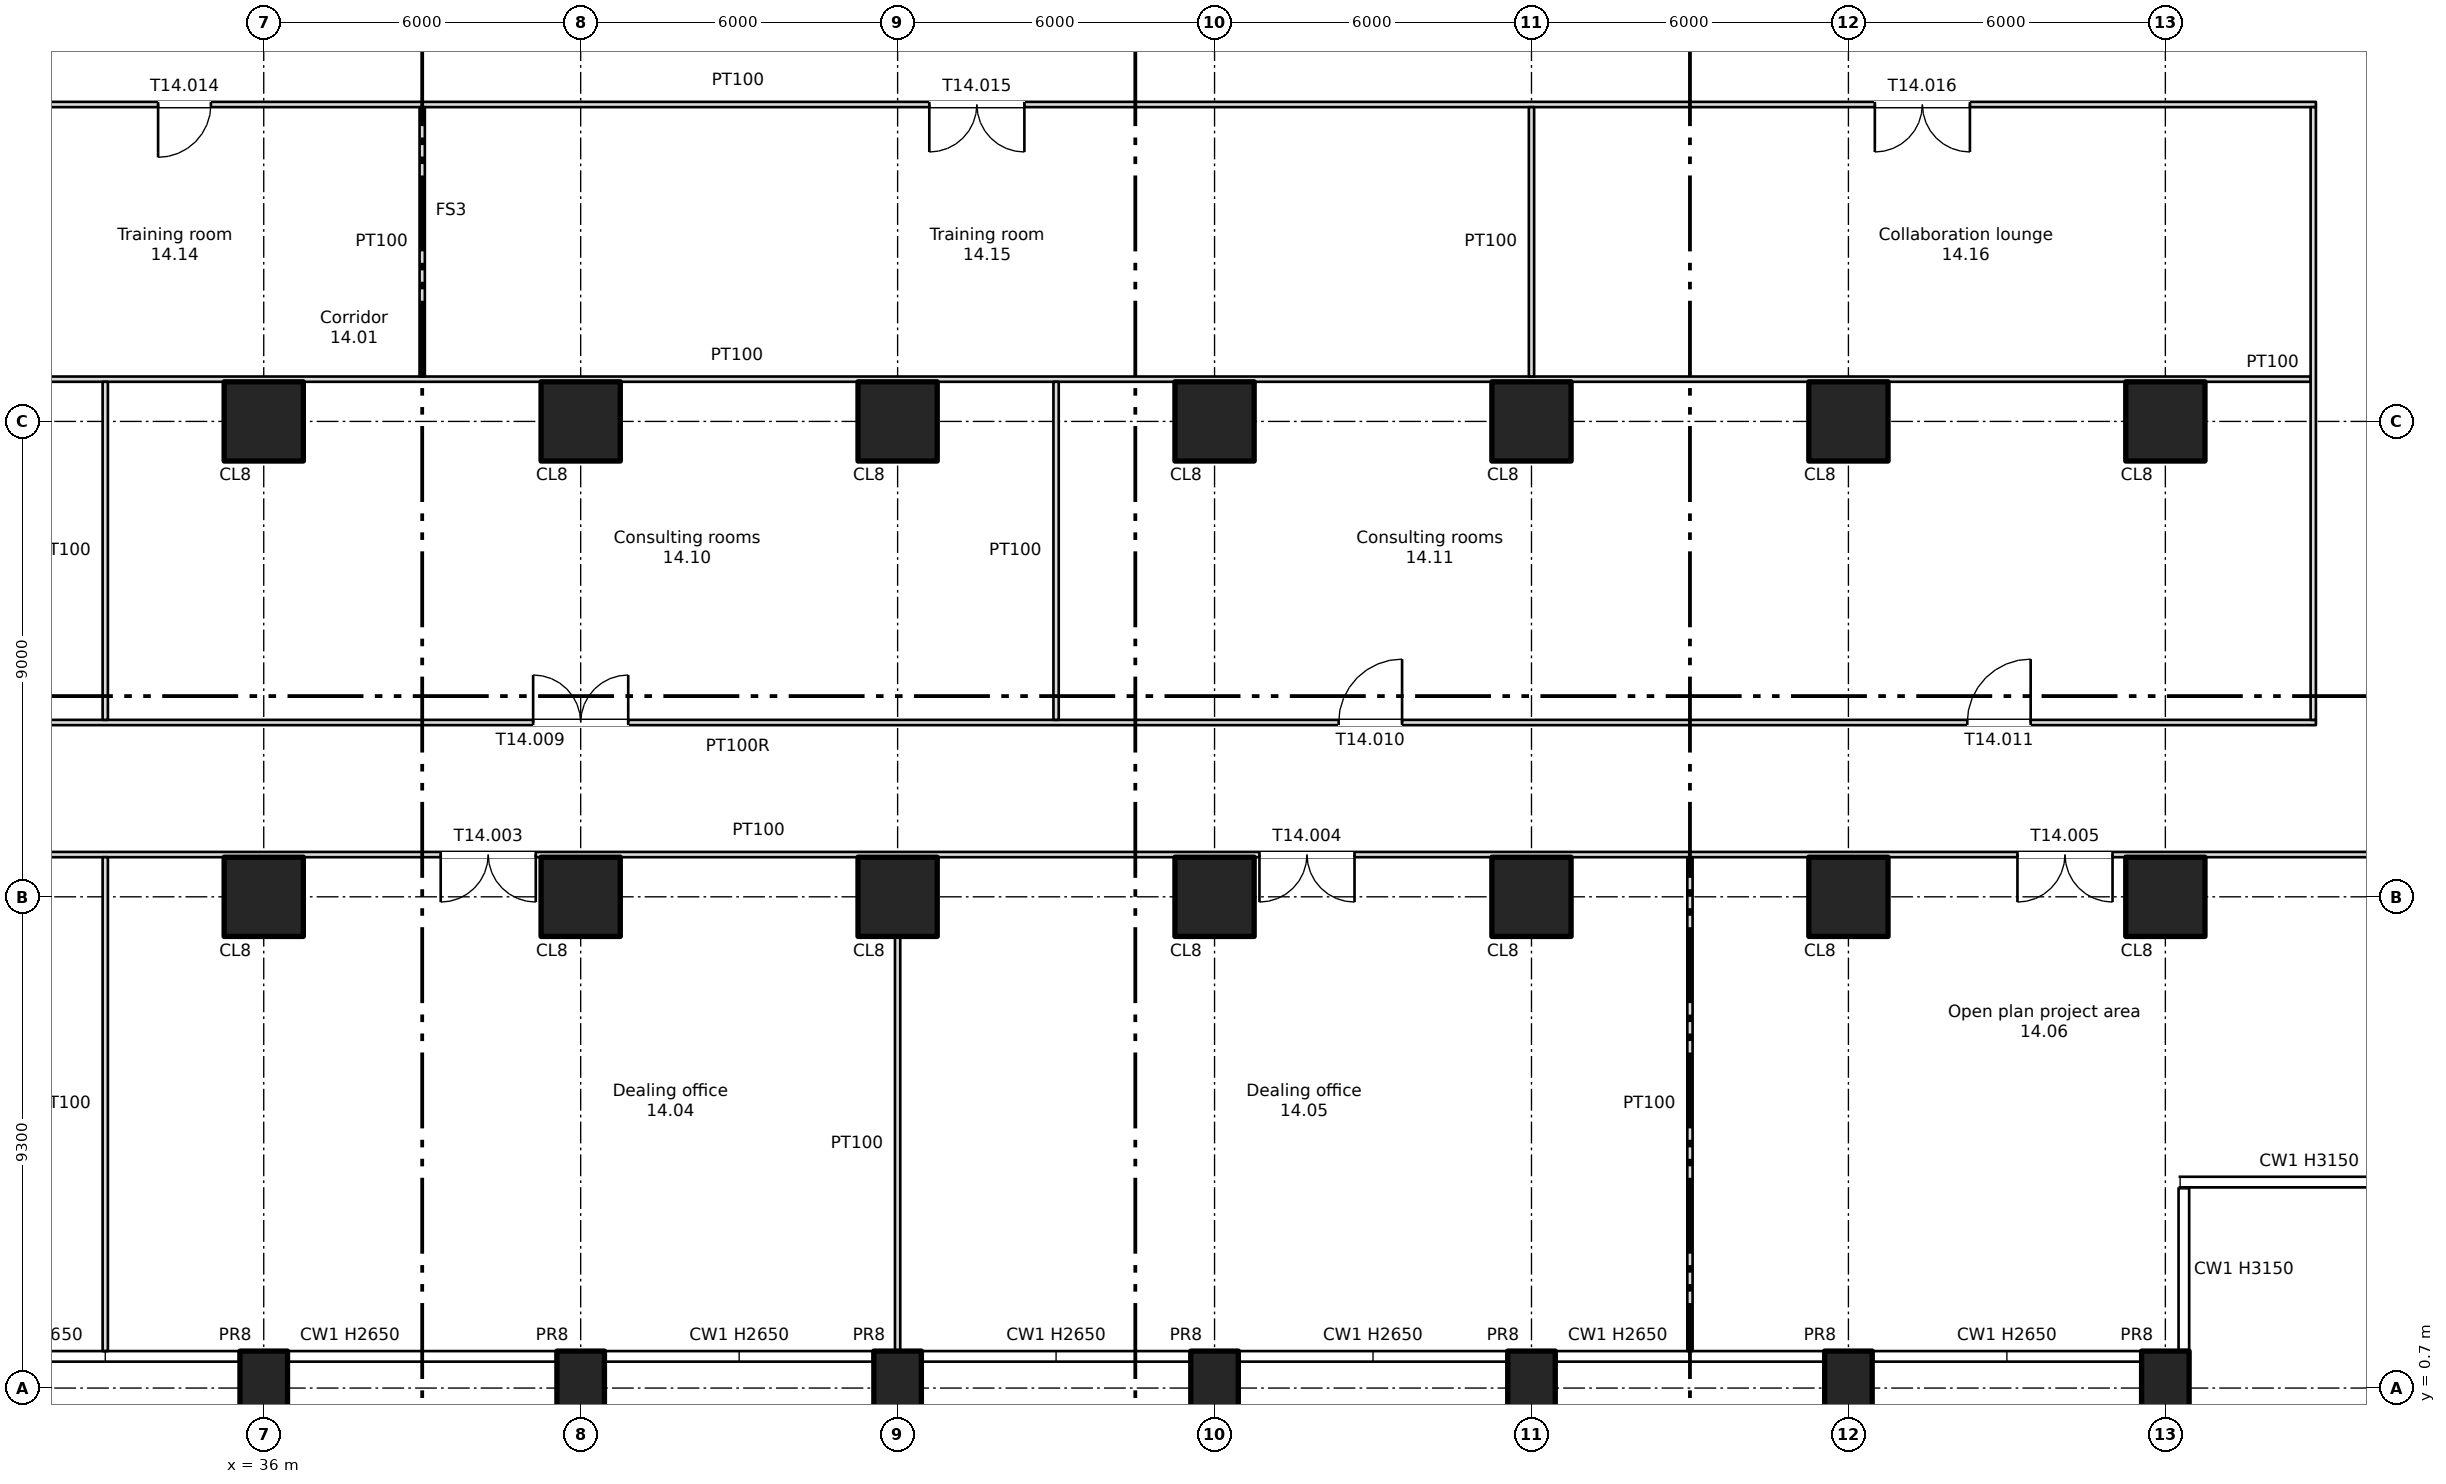
"""IFC4 building model, lengths in metres.
Left out: names, types, materials, properties, quantities, classifications, styles, units other than length and angle.
Written with IfcOpenShell. Run it as: python <this file> out.ifc"""

import sys

from ifc_helpers import new_model, si_unit, direction, frame, frame_2d, origin, origin_2d, place, context, subcontext, project, spatial, rectangle, extrude, element, fill, save


model = new_model("IFC4")
c1 = context("Model", 3, precision=1e-05, world=origin(), true_north=direction((0.0, 1.0)))
c2 = subcontext(c1, "Body", "Model", "MODEL_VIEW")
j1 = project(units=[si_unit("LENGTHUNIT", "METRE"), si_unit("PLANEANGLEUNIT", "RADIAN")], contexts=[c1])
p1 = place(None, origin())
s1 = spatial("IfcSite", under=j1, at=p1, CompositionType="ELEMENT")
p2 = place(p1, origin())
s2 = spatial("IfcBuilding", under=s1, at=p2, CompositionType="ELEMENT")
p3 = place(p2, frame((0.0, 0.0, 86.25)))
s3 = spatial("IfcBuildingStorey", under=s2, at=p3, CompositionType="ELEMENT", Elevation=86.25)
for number, where, z_axis, x_axis in (
    (1, (36.0, 0.7, -0.4), (0.0, 0.0, 1.0), (1.0, 0.0, 0.0)),
    (2, (42.0, 0.7, -0.4), (0.0, 0.0, 1.0), (1.0, 0.0, 0.0)),
    (3, (48.0, 0.7, -0.4), (0.0, 0.0, 1.0), (1.0, 0.0, 0.0)),
    (4, (54.0, 0.7, -0.4), (0.0, 0.0, 1.0), (1.0, 0.0, 0.0)),
    (5, (60.0, 0.7, -0.4), (0.0, 0.0, 1.0), (1.0, 0.0, 0.0)),
    (6, (66.0, 0.7, -0.4), (0.0, 0.0, 1.0), (1.0, 0.0, 0.0)),
    (7, (72.0, 0.7, -0.4), (0.0, 0.0, 1.0), (1.0, 0.0, 0.0)),
):
    element("IfcColumn", number, at=place(p3, frame(where, z_axis=z_axis, x_axis=x_axis)), inside=s3, PredefinedType="COLUMN", context=c2, shape_type="SweptSolid", body=[
        extrude(rectangle(XDim=0.9, YDim=1.4, at=origin_2d()), origin(), (0.0, 0.0, 1.0), 3.55),
    ])
for number, where, z_axis, x_axis in (
    (8, (36.0, 10.0, 0.0), (0.0, 0.0, 1.0), (1.0, 0.0, 0.0)),
    (9, (36.0, 19.0, 0.0), (0.0, 0.0, 1.0), (1.0, 0.0, 0.0)),
    (10, (42.0, 10.0, 0.0), (0.0, 0.0, 1.0), (1.0, 0.0, 0.0)),
    (11, (42.0, 19.0, 0.0), (0.0, 0.0, 1.0), (1.0, 0.0, 0.0)),
    (12, (48.0, 10.0, 0.0), (0.0, 0.0, 1.0), (1.0, 0.0, 0.0)),
    (13, (48.0, 19.0, 0.0), (0.0, 0.0, 1.0), (1.0, 0.0, 0.0)),
    (14, (54.0, 10.0, 0.0), (0.0, 0.0, 1.0), (1.0, 0.0, 0.0)),
    (15, (54.0, 19.0, 0.0), (0.0, 0.0, 1.0), (1.0, 0.0, 0.0)),
    (16, (60.0, 10.0, 0.0), (0.0, 0.0, 1.0), (1.0, 0.0, 0.0)),
    (17, (60.0, 19.0, 0.0), (0.0, 0.0, 1.0), (1.0, 0.0, 0.0)),
    (18, (66.0, 10.0, 0.0), (0.0, 0.0, 1.0), (1.0, 0.0, 0.0)),
    (19, (66.0, 19.0, 0.0), (0.0, 0.0, 1.0), (1.0, 0.0, 0.0)),
    (20, (72.0, 10.0, 0.0), (0.0, 0.0, 1.0), (1.0, 0.0, 0.0)),
    (21, (72.0, 19.0, 0.0), (0.0, 0.0, 1.0), (1.0, 0.0, 0.0)),
):
    element("IfcColumn", number, at=place(p3, frame(where, z_axis=z_axis, x_axis=x_axis)), inside=s3, PredefinedType="COLUMN", context=c2, shape_type="SweptSolid", body=[
        extrude(rectangle(XDim=1.5, YDim=1.5, at=origin_2d()), origin(), (0.0, 0.0, 1.0), 3.15),
    ])
p4 = place(p3, frame((0.8, 10.8, 0.0), z_axis=(0.0, 0.0, 1.0), x_axis=(1.0, 0.0, 0.0)))
e22 = element("IfcWall", 22, at=p4, inside=s3, PredefinedType="PARTITIONING", context=c2, shape_type="SweptSolid", body=[
    extrude(rectangle(XDim=76.4, YDim=0.1, at=frame_2d((38.2, 0.0))), origin(), (0.0, 0.0, 1.0), 3.15),
])
p5 = place(p4, frame((14.55, 0.0, 0.0)))
e23 = element("IfcOpeningElement", 23, at=p5, cuts=e22, PredefinedType="OPENING", context=c2, shape_type="SweptSolid", body=[
    extrude(rectangle(XDim=1.8, YDim=2.1, at=frame_2d((0.9, 1.05))), frame((0.0, 0.06, 0.0), z_axis=(0.0, -1.0, 0.0), x_axis=(1.0, 0.0, 0.0)), (0.0, 0.0, 1.0), 0.12),
])
p6 = place(p4, frame((26.55, 0.0, 0.0)))
e24 = element("IfcOpeningElement", 24, at=p6, cuts=e22, PredefinedType="OPENING", context=c2, shape_type="SweptSolid", body=[
    extrude(rectangle(XDim=1.8, YDim=2.1, at=frame_2d((0.9, 1.05))), frame((0.0, 0.06, 0.0), z_axis=(0.0, -1.0, 0.0), x_axis=(1.0, 0.0, 0.0)), (0.0, 0.0, 1.0), 0.12),
])
p7 = place(p4, frame((38.55, 0.0, 0.0)))
e25 = element("IfcOpeningElement", 25, at=p7, cuts=e22, PredefinedType="OPENING", context=c2, shape_type="SweptSolid", body=[
    extrude(rectangle(XDim=1.8, YDim=2.1, at=frame_2d((0.9, 1.05))), frame((0.0, 0.06, 0.0), z_axis=(0.0, -1.0, 0.0), x_axis=(1.0, 0.0, 0.0)), (0.0, 0.0, 1.0), 0.12),
])
p8 = place(p4, frame((54.05, 0.0, 0.0)))
e26 = element("IfcOpeningElement", 26, at=p8, cuts=e22, PredefinedType="OPENING", context=c2, shape_type="SweptSolid", body=[
    extrude(rectangle(XDim=1.8, YDim=2.1, at=frame_2d((0.9, 1.05))), frame((0.0, 0.06, 0.0), z_axis=(0.0, -1.0, 0.0), x_axis=(1.0, 0.0, 0.0)), (0.0, 0.0, 1.0), 0.12),
])
p9 = place(p4, frame((68.4, 0.0, 0.0)))
e27 = element("IfcOpeningElement", 27, at=p9, cuts=e22, PredefinedType="OPENING", context=c2, shape_type="SweptSolid", body=[
    extrude(rectangle(XDim=1.8, YDim=2.1, at=frame_2d((0.9, 1.05))), frame((0.0, 0.06, 0.0), z_axis=(0.0, -1.0, 0.0), x_axis=(1.0, 0.0, 0.0)), (0.0, 0.0, 1.0), 0.12),
])
p10 = place(p4, frame((2.45, 0.0, 0.0)))
e28 = element("IfcOpeningElement", 28, at=p10, cuts=e22, PredefinedType="OPENING", context=c2, shape_type="SweptSolid", body=[
    extrude(rectangle(XDim=1.8, YDim=2.1, at=frame_2d((0.9, 1.05))), frame((0.0, 0.06, 0.0), z_axis=(0.0, -1.0, 0.0), x_axis=(1.0, 0.0, 0.0)), (0.0, 0.0, 1.0), 0.12),
])
p11 = place(p3, frame((3.15, 13.3, 0.0), z_axis=(0.0, 0.0, 1.0), x_axis=(1.0, 0.0, 0.0)))
e29 = element("IfcWall", 29, at=p11, inside=s3, PredefinedType="PARTITIONING", context=c2, shape_type="SweptSolid", body=[
    extrude(rectangle(XDim=71.7, YDim=0.1, at=frame_2d((35.85, 0.0))), origin(), (0.0, 0.0, 1.0), 3.15),
])
p12 = place(p11, frame((5.45, 0.0, 0.0)))
e30 = element("IfcOpeningElement", 30, at=p12, cuts=e29, PredefinedType="OPENING", context=c2, shape_type="SweptSolid", body=[
    extrude(rectangle(XDim=1.0, YDim=2.1, at=frame_2d((0.5, 1.05))), frame((0.0, 0.06, 0.0), z_axis=(0.0, -1.0, 0.0), x_axis=(1.0, 0.0, 0.0)), (0.0, 0.0, 1.0), 0.12),
])
p13 = place(p11, frame((19.95, 0.0, 0.0)))
e31 = element("IfcOpeningElement", 31, at=p13, cuts=e29, PredefinedType="OPENING", context=c2, shape_type="SweptSolid", body=[
    extrude(rectangle(XDim=1.8, YDim=2.1, at=frame_2d((0.9, 1.05))), frame((0.0, 0.06, 0.0), z_axis=(0.0, -1.0, 0.0), x_axis=(1.0, 0.0, 0.0)), (0.0, 0.0, 1.0), 0.12),
])
p14 = place(p11, frame((37.95, 0.0, 0.0)))
e32 = element("IfcOpeningElement", 32, at=p14, cuts=e29, PredefinedType="OPENING", context=c2, shape_type="SweptSolid", body=[
    extrude(rectangle(XDim=1.8, YDim=2.1, at=frame_2d((0.9, 1.05))), frame((0.0, 0.06, 0.0), z_axis=(0.0, -1.0, 0.0), x_axis=(1.0, 0.0, 0.0)), (0.0, 0.0, 1.0), 0.12),
])
p15 = place(p11, frame((53.2, 0.0, 0.0)))
e33 = element("IfcOpeningElement", 33, at=p15, cuts=e29, PredefinedType="OPENING", context=c2, shape_type="SweptSolid", body=[
    extrude(rectangle(XDim=1.2, YDim=2.1, at=frame_2d((0.6, 1.05))), frame((0.0, 0.06, 0.0), z_axis=(0.0, -1.0, 0.0), x_axis=(1.0, 0.0, 0.0)), (0.0, 0.0, 1.0), 0.12),
])
p16 = place(p11, frame((65.1, 0.0, 0.0)))
e34 = element("IfcOpeningElement", 34, at=p16, cuts=e29, PredefinedType="OPENING", context=c2, shape_type="SweptSolid", body=[
    extrude(rectangle(XDim=1.2, YDim=2.1, at=frame_2d((0.6, 1.05))), frame((0.0, 0.06, 0.0), z_axis=(0.0, -1.0, 0.0), x_axis=(1.0, 0.0, 0.0)), (0.0, 0.0, 1.0), 0.12),
])
p17 = place(p3, frame((3.25, 19.8, 0.0), z_axis=(0.0, 0.0, 1.0), x_axis=(1.0, 0.0, 0.0)))
e35 = element("IfcWall", 35, at=p17, inside=s3, PredefinedType="PARTITIONING", context=c2, shape_type="SweptSolid", body=[
    extrude(rectangle(XDim=71.5, YDim=0.1, at=frame_2d((35.75, 0.0))), origin(), (0.0, 0.0, 1.0), 3.15),
])
p18 = place(p3, frame((3.15, 25.0, 0.0), z_axis=(0.0, 0.0, 1.0), x_axis=(1.0, 0.0, 0.0)))
e36 = element("IfcWall", 36, at=p18, inside=s3, PredefinedType="PARTITIONING", context=c2, shape_type="SweptSolid", body=[
    extrude(rectangle(XDim=71.7, YDim=0.1, at=frame_2d((35.85, 0.0))), origin(), (0.0, 0.0, 1.0), 3.15),
])
p19 = place(p18, frame((6.55, 0.0, 0.0)))
e37 = element("IfcOpeningElement", 37, at=p19, cuts=e36, PredefinedType="OPENING", context=c2, shape_type="SweptSolid", body=[
    extrude(rectangle(XDim=1.8, YDim=2.1, at=frame_2d((0.9, 1.05))), frame((0.0, 0.06, 0.0), z_axis=(0.0, -1.0, 0.0), x_axis=(1.0, 0.0, 0.0)), (0.0, 0.0, 1.0), 0.12),
])
p20 = place(p18, frame((19.95, 0.0, 0.0)))
e38 = element("IfcOpeningElement", 38, at=p20, cuts=e36, PredefinedType="OPENING", context=c2, shape_type="SweptSolid", body=[
    extrude(rectangle(XDim=1.8, YDim=2.1, at=frame_2d((0.9, 1.05))), frame((0.0, 0.06, 0.0), z_axis=(0.0, -1.0, 0.0), x_axis=(1.0, 0.0, 0.0)), (0.0, 0.0, 1.0), 0.12),
])
p21 = place(p18, frame((30.85, 0.0, 0.0)))
e39 = element("IfcOpeningElement", 39, at=p21, cuts=e36, PredefinedType="OPENING", context=c2, shape_type="SweptSolid", body=[
    extrude(rectangle(XDim=1.0, YDim=2.1, at=frame_2d((0.5, 1.05))), frame((0.0, 0.06, 0.0), z_axis=(0.0, -1.0, 0.0), x_axis=(1.0, 0.0, 0.0)), (0.0, 0.0, 1.0), 0.12),
])
p22 = place(p18, frame((45.45, 0.0, 0.0)))
e40 = element("IfcOpeningElement", 40, at=p22, cuts=e36, PredefinedType="OPENING", context=c2, shape_type="SweptSolid", body=[
    extrude(rectangle(XDim=1.8, YDim=2.1, at=frame_2d((0.9, 1.05))), frame((0.0, 0.06, 0.0), z_axis=(0.0, -1.0, 0.0), x_axis=(1.0, 0.0, 0.0)), (0.0, 0.0, 1.0), 0.12),
])
p23 = place(p18, frame((63.35, 0.0, 0.0)))
e41 = element("IfcOpeningElement", 41, at=p23, cuts=e36, PredefinedType="OPENING", context=c2, shape_type="SweptSolid", body=[
    extrude(rectangle(XDim=1.8, YDim=2.1, at=frame_2d((0.9, 1.05))), frame((0.0, 0.06, 0.0), z_axis=(0.0, -1.0, 0.0), x_axis=(1.0, 0.0, 0.0)), (0.0, 0.0, 1.0), 0.12),
])
p24 = place(p3, frame((33.0, 1.4, 0.0), z_axis=(0.0, 0.0, 1.0), x_axis=(0.0, 1.0, 0.0)))
e42 = element("IfcWall", 42, at=p24, inside=s3, PredefinedType="PARTITIONING", context=c2, shape_type="SweptSolid", body=[
    extrude(rectangle(XDim=9.35, YDim=0.1, at=frame_2d((4.675, 0.0))), origin(), (0.0, 0.0, 1.0), 3.15),
])
p25 = place(p3, frame((33.0, 13.35, 0.0), z_axis=(0.0, 0.0, 1.0), x_axis=(0.0, 1.0, 0.0)))
e43 = element("IfcWall", 43, at=p25, inside=s3, PredefinedType="PARTITIONING", context=c2, shape_type="SweptSolid", body=[
    extrude(rectangle(XDim=6.4, YDim=0.1, at=frame_2d((3.2, 0.0))), origin(), (0.0, 0.0, 1.0), 3.15),
])
p26 = place(p3, frame((39.0, 19.85, 0.0), z_axis=(0.0, 0.0, 1.0), x_axis=(0.0, 1.0, 0.0)))
e44 = element("IfcWall", 44, at=p26, inside=s3, PredefinedType="PARTITIONING", context=c2, shape_type="SweptSolid", body=[
    extrude(rectangle(XDim=5.1, YDim=0.1, at=frame_2d((2.55, 0.0))), origin(), (0.0, 0.0, 1.0), 3.15),
])
p27 = place(p3, frame((48.0, 1.4, 0.0), z_axis=(0.0, 0.0, 1.0), x_axis=(0.0, 1.0, 0.0)))
e45 = element("IfcWall", 45, at=p27, inside=s3, PredefinedType="PARTITIONING", context=c2, shape_type="SweptSolid", body=[
    extrude(rectangle(XDim=7.85, YDim=0.1, at=frame_2d((3.925, 0.0))), origin(), (0.0, 0.0, 1.0), 3.15),
])
p28 = place(p3, frame((51.0, 13.35, 0.0), z_axis=(0.0, 0.0, 1.0), x_axis=(0.0, 1.0, 0.0)))
e46 = element("IfcWall", 46, at=p28, inside=s3, PredefinedType="PARTITIONING", context=c2, shape_type="SweptSolid", body=[
    extrude(rectangle(XDim=6.4, YDim=0.1, at=frame_2d((3.2, 0.0))), origin(), (0.0, 0.0, 1.0), 3.15),
])
p29 = place(p3, frame((60.0, 19.85, 0.0), z_axis=(0.0, 0.0, 1.0), x_axis=(0.0, 1.0, 0.0)))
e47 = element("IfcWall", 47, at=p29, inside=s3, PredefinedType="PARTITIONING", context=c2, shape_type="SweptSolid", body=[
    extrude(rectangle(XDim=5.1, YDim=0.1, at=frame_2d((2.55, 0.0))), origin(), (0.0, 0.0, 1.0), 3.15),
])
p30 = place(p3, frame((63.0, 1.4, 0.0), z_axis=(0.0, 0.0, 1.0), x_axis=(0.0, 1.0, 0.0)))
e48 = element("IfcWall", 48, at=p30, inside=s3, PredefinedType="PARTITIONING", context=c2, shape_type="SweptSolid", body=[
    extrude(rectangle(XDim=9.35, YDim=0.1, at=frame_2d((4.675, 0.0))), origin(), (0.0, 0.0, 1.0), 3.15),
])
p31 = place(p3, frame((74.8, 13.35, 0.0), z_axis=(0.0, 0.0, 1.0), x_axis=(0.0, 1.0, 0.0)))
e49 = element("IfcWall", 49, at=p31, inside=s3, PredefinedType="PARTITIONING", context=c2, shape_type="SweptSolid", body=[
    extrude(rectangle(XDim=11.6, YDim=0.1, at=frame_2d((5.8, 0.0))), origin(), (0.0, 0.0, 1.0), 3.15),
])
p32 = place(p7, origin())
e50 = element("IfcDoor", 50, at=p32, inside=s3, OperationType="DOUBLE_DOOR_SINGLE_SWING", PredefinedType="DOOR", context=c2, shape_type="SweptSolid", body=[
    extrude(rectangle(XDim=1.8, YDim=2.1, at=frame_2d((0.9, 1.05))), frame((0.0, 0.025, 0.0), z_axis=(0.0, -1.0, 0.0), x_axis=(1.0, 0.0, 0.0)), (0.0, 0.0, 1.0), 0.05),
])
fill(e25, e50)
p33 = place(p8, origin())
e51 = element("IfcDoor", 51, at=p33, inside=s3, OperationType="DOUBLE_DOOR_SINGLE_SWING", PredefinedType="DOOR", context=c2, shape_type="SweptSolid", body=[
    extrude(rectangle(XDim=1.8, YDim=2.1, at=frame_2d((0.9, 1.05))), frame((0.0, 0.025, 0.0), z_axis=(0.0, -1.0, 0.0), x_axis=(1.0, 0.0, 0.0)), (0.0, 0.0, 1.0), 0.05),
])
fill(e26, e51)
p34 = place(p9, origin())
e52 = element("IfcDoor", 52, at=p34, inside=s3, OperationType="DOUBLE_DOOR_SINGLE_SWING", PredefinedType="DOOR", context=c2, shape_type="SweptSolid", body=[
    extrude(rectangle(XDim=1.8, YDim=2.1, at=frame_2d((0.9, 1.05))), frame((0.0, 0.025, 0.0), z_axis=(0.0, -1.0, 0.0), x_axis=(1.0, 0.0, 0.0)), (0.0, 0.0, 1.0), 0.05),
])
fill(e27, e52)
p35 = place(p14, origin())
e53 = element("IfcDoor", 53, at=p35, inside=s3, OperationType="DOUBLE_DOOR_SINGLE_SWING", PredefinedType="DOOR", context=c2, shape_type="SweptSolid", body=[
    extrude(rectangle(XDim=1.8, YDim=2.1, at=frame_2d((0.9, 1.05))), frame((0.0, 0.025, 0.0), z_axis=(0.0, -1.0, 0.0), x_axis=(1.0, 0.0, 0.0)), (0.0, 0.0, 1.0), 0.05),
])
fill(e32, e53)
p36 = place(p15, origin())
e54 = element("IfcDoor", 54, at=p36, inside=s3, OperationType="SINGLE_SWING_RIGHT", PredefinedType="DOOR", context=c2, shape_type="SweptSolid", body=[
    extrude(rectangle(XDim=1.2, YDim=2.1, at=frame_2d((0.6, 1.05))), frame((0.0, 0.025, 0.0), z_axis=(0.0, -1.0, 0.0), x_axis=(1.0, 0.0, 0.0)), (0.0, 0.0, 1.0), 0.05),
])
fill(e33, e54)
p37 = place(p16, origin())
e55 = element("IfcDoor", 55, at=p37, inside=s3, OperationType="SINGLE_SWING_RIGHT", PredefinedType="DOOR", context=c2, shape_type="SweptSolid", body=[
    extrude(rectangle(XDim=1.2, YDim=2.1, at=frame_2d((0.6, 1.05))), frame((0.0, 0.025, 0.0), z_axis=(0.0, -1.0, 0.0), x_axis=(1.0, 0.0, 0.0)), (0.0, 0.0, 1.0), 0.05),
])
fill(e34, e55)
p38 = place(p21, origin())
e56 = element("IfcDoor", 56, at=p38, inside=s3, OperationType="SINGLE_SWING_LEFT", PredefinedType="DOOR", context=c2, shape_type="SweptSolid", body=[
    extrude(rectangle(XDim=1.0, YDim=2.1, at=frame_2d((0.5, 1.05))), frame((0.0, 0.025, 0.0), z_axis=(0.0, -1.0, 0.0), x_axis=(1.0, 0.0, 0.0)), (0.0, 0.0, 1.0), 0.05),
])
fill(e39, e56)
p39 = place(p22, origin())
e57 = element("IfcDoor", 57, at=p39, inside=s3, OperationType="DOUBLE_DOOR_SINGLE_SWING", PredefinedType="DOOR", context=c2, shape_type="SweptSolid", body=[
    extrude(rectangle(XDim=1.8, YDim=2.1, at=frame_2d((0.9, 1.05))), frame((0.0, 0.025, 0.0), z_axis=(0.0, -1.0, 0.0), x_axis=(1.0, 0.0, 0.0)), (0.0, 0.0, 1.0), 0.05),
])
fill(e40, e57)
p40 = place(p23, origin())
e58 = element("IfcDoor", 58, at=p40, inside=s3, OperationType="DOUBLE_DOOR_SINGLE_SWING", PredefinedType="DOOR", context=c2, shape_type="SweptSolid", body=[
    extrude(rectangle(XDim=1.8, YDim=2.1, at=frame_2d((0.9, 1.05))), frame((0.0, 0.025, 0.0), z_axis=(0.0, -1.0, 0.0), x_axis=(1.0, 0.0, 0.0)), (0.0, 0.0, 1.0), 0.05),
])
fill(e41, e58)
save(model, sys.argv[1])
